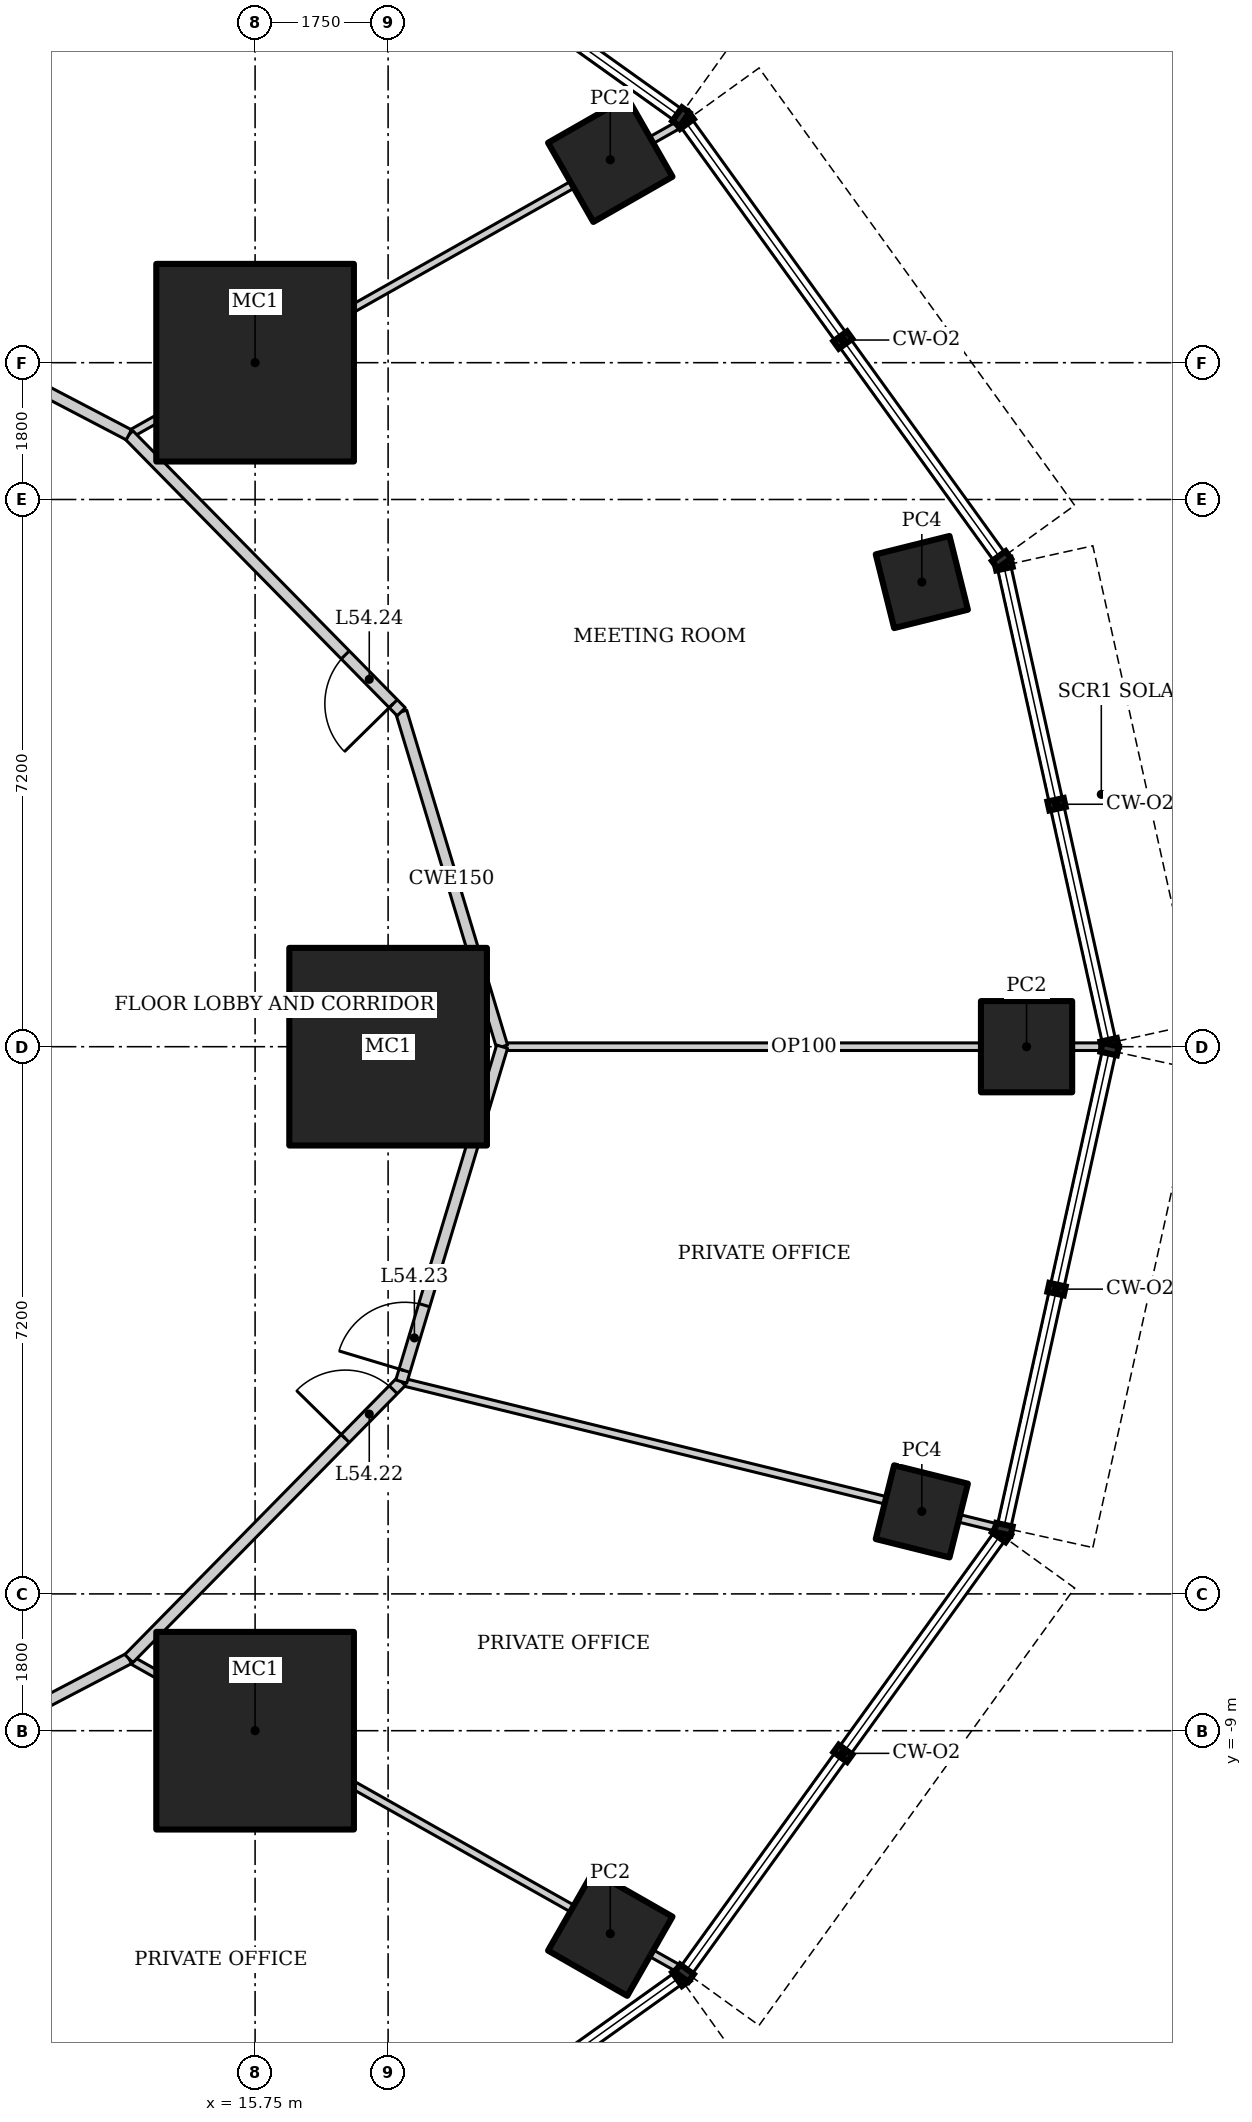
"""IFC4 building model, lengths in metres.
Left out: names, types, materials, properties, quantities, classifications, styles, units other than length and angle.
Written with IfcOpenShell. Run it as: python <this file> out.ifc"""

import sys

from ifc_helpers import new_model, si_unit, direction, frame, frame_2d, origin, origin_2d, place, context, subcontext, project, spatial, rectangle, hollow_rectangle, extrude, element, fill, save


model = new_model("IFC4")
c1 = context("Model", 3, precision=1e-05, world=origin(), true_north=direction((0.0, 1.0)))
c2 = subcontext(c1, "Body", "Model", "MODEL_VIEW")
j1 = project(units=[si_unit("LENGTHUNIT", "METRE"), si_unit("PLANEANGLEUNIT", "RADIAN")], contexts=[c1])
p1 = place(None, origin())
s1 = spatial("IfcSite", under=j1, at=p1, CompositionType="ELEMENT")
p2 = place(p1, origin())
s2 = spatial("IfcBuilding", under=s1, at=p2, CompositionType="ELEMENT")
p3 = place(p2, frame((0.0, 0.0, 232.6)))
s3 = spatial("IfcBuildingStorey", under=s2, at=p3, CompositionType="ELEMENT", Elevation=232.6)
for number, where, z_axis, x_axis in (
    (1, (17.5, 0.0, 0.0), (0.0, 0.0, 1.0), (1.0, 0.0, 0.0)),
    (2, (15.75, 9.0, 0.0), (0.0, 0.0, 1.0), (1.0, 0.0, 0.0)),
    (3, (15.75, -9.0, 0.0), (0.0, 0.0, 1.0), (1.0, 0.0, 0.0)),
):
    element("IfcColumn", number, at=place(p3, frame(where, z_axis=z_axis, x_axis=x_axis)), inside=s3, PredefinedType="COLUMN", context=c2, shape_type="SweptSolid", body=[
        extrude(hollow_rectangle(XDim=2.6, YDim=2.6, WallThickness=0.13, at=origin_2d()), origin(), (0.0, 0.0, 1.0), 4.2),
    ])
p4 = place(p3, frame((25.9, 0.0, 0.0), z_axis=(0.0, 0.0, 1.0), x_axis=(1.0, 0.0, 0.0)))
e4 = element("IfcColumn", 4, at=p4, inside=s3, PredefinedType="COLUMN", context=c2, shape_type="SweptSolid", body=[
    extrude(hollow_rectangle(XDim=1.2, YDim=1.2, WallThickness=0.1, at=origin_2d()), origin(), (0.0, 0.0, 1.0), 4.2),
])
p5 = place(p3, frame((24.522, 6.114, 0.0), z_axis=(0.0, 0.0, 1.0), x_axis=(0.970295726276, 0.2419218956, 0.0)))
e5 = element("IfcColumn", 5, at=p5, inside=s3, PredefinedType="COLUMN", context=c2, shape_type="SweptSolid", body=[
    extrude(hollow_rectangle(XDim=1.0, YDim=1.0, WallThickness=0.08, at=origin_2d()), origin(), (0.0, 0.0, 1.0), 4.2),
])
for number, where, z_axis, x_axis in (
    (6, (20.423, 11.67, 0.0), (0.0, 0.0, 1.0), (0.868, 0.496, 0.0)),
    (7, (20.423, -11.67, 0.0), (0.0, 0.0, 1.0), (0.496, 0.868, 0.0)),
):
    element("IfcColumn", number, at=place(p3, frame(where, z_axis=z_axis, x_axis=x_axis)), inside=s3, PredefinedType="COLUMN", context=c2, shape_type="SweptSolid", body=[
        extrude(hollow_rectangle(XDim=1.2, YDim=1.2, WallThickness=0.1, at=origin_2d()), origin(), (0.0, 0.0, 1.0), 4.2),
    ])
p6 = place(p3, frame((24.522, -6.114, 0.0), z_axis=(0.0, 0.0, 1.0), x_axis=(0.2419218956, 0.970295726276, 0.0)))
e8 = element("IfcColumn", 8, at=p6, inside=s3, PredefinedType="COLUMN", context=c2, shape_type="SweptSolid", body=[
    extrude(hollow_rectangle(XDim=1.0, YDim=1.0, WallThickness=0.08, at=origin_2d()), origin(), (0.0, 0.0, 1.0), 4.2),
])
p7 = place(p3, frame((26.944, 0.0, 0.0), z_axis=(0.0, 0.0, 1.0), x_axis=(-1.0, 0.0, 0.0)))
e9 = element("IfcWall", 9, at=p7, inside=s3, PredefinedType="PARTITIONING", context=c2, shape_type="SweptSolid", body=[
    extrude(rectangle(XDim=7.944, YDim=0.1, at=frame_2d((3.972, 0.0))), origin(), (0.0, 0.0, 1.0), 3.349),
])
p8 = place(p3, frame((21.358, 12.15, 0.0), z_axis=(0.0, 0.0, 1.0), x_axis=(-0.871080529249, -0.491140215786, 0.0)))
e10 = element("IfcWall", 10, at=p8, inside=s3, PredefinedType="PARTITIONING", context=c2, shape_type="SweptSolid", body=[
    extrude(rectangle(XDim=8.345, YDim=0.1, at=frame_2d((4.173, 0.0))), origin(), (0.0, 0.0, 1.0), 3.524),
])
p9 = place(p3, frame((15.709, -16.199, 0.0), z_axis=(0.0, 0.0, 1.0), x_axis=(-0.69875697861, 0.715359129978, 0.0)))
e11 = element("IfcWall", 11, at=p9, inside=s3, PredefinedType="PARTITIONING", context=c2, shape_type="SweptSolid", body=[
    extrude(rectangle(XDim=8.323, YDim=0.1, at=frame_2d((4.162, 0.0))), origin(), (0.0, 0.0, 1.0), 3.41),
])
p10 = place(p3, frame((21.358, -12.15, 0.0), z_axis=(0.0, 0.0, 1.0), x_axis=(-0.871080529249, 0.491140215786, 0.0)))
e12 = element("IfcWall", 12, at=p10, inside=s3, PredefinedType="PARTITIONING", context=c2, shape_type="SweptSolid", body=[
    extrude(rectangle(XDim=8.345, YDim=0.1, at=frame_2d((4.173, 0.0))), origin(), (0.0, 0.0, 1.0), 3.521),
])
p11 = place(p3, frame((25.543, -6.336, 0.0), z_axis=(0.0, 0.0, 1.0), x_axis=(-0.97123661777, 0.238116425942, 0.0)))
e13 = element("IfcWall", 13, at=p11, inside=s3, PredefinedType="PARTITIONING", context=c2, shape_type="SweptSolid", body=[
    extrude(rectangle(XDim=8.103, YDim=0.1, at=frame_2d((4.052, 0.0))), origin(), (0.0, 0.0, 1.0), 3.108),
])
p12 = place(p3, frame((19.0, 0.0, 0.0), z_axis=(0.0, 0.0, 1.0), x_axis=(-0.288399048695, 0.957510307366, 0.0)))
e14 = element("IfcWall", 14, at=p12, inside=s3, PredefinedType="PARTITIONING", context=c2, shape_type="SweptSolid", body=[
    extrude(rectangle(XDim=4.602, YDim=0.15, at=frame_2d((2.301, 0.0))), origin(), (0.0, 0.0, 1.0), 4.05),
])
p13 = place(p3, frame((17.673, 4.406, 0.0), z_axis=(0.0, 0.0, 1.0), x_axis=(-0.701111216625, 0.713051934941, 0.0)))
e15 = element("IfcWall", 15, at=p13, inside=s3, PredefinedType="PARTITIONING", context=c2, shape_type="SweptSolid", body=[
    extrude(rectangle(XDim=5.112, YDim=0.15, at=frame_2d((2.556, 0.0))), origin(), (0.0, 0.0, 1.0), 4.05),
])
p14 = place(p13, frame((0.15, 0.0, 0.0)))
e16 = element("IfcOpeningElement", 16, at=p14, cuts=e15, PredefinedType="OPENING", context=c2, shape_type="SweptSolid", body=[
    extrude(rectangle(XDim=0.9, YDim=2.1, at=frame_2d((0.45, 1.05))), frame((0.0, 0.085, 0.0), z_axis=(0.0, -1.0, 0.0), x_axis=(1.0, 0.0, 0.0)), (0.0, 0.0, 1.0), 0.17),
])
p15 = place(p3, frame((14.089, 8.051, 0.0), z_axis=(0.0, 0.0, 1.0), x_axis=(-0.886174439647, 0.463351769735, 0.0)))
e17 = element("IfcWall", 17, at=p15, inside=s3, PredefinedType="PARTITIONING", context=c2, shape_type="SweptSolid", body=[
    extrude(rectangle(XDim=4.735, YDim=0.15, at=frame_2d((2.367, 0.0))), origin(), (0.0, 0.0, 1.0), 4.05),
])
p16 = place(p3, frame((9.893, -10.245, 0.0), z_axis=(0.0, 0.0, 1.0), x_axis=(0.886174439647, 0.463351769735, 0.0)))
e18 = element("IfcWall", 18, at=p16, inside=s3, PredefinedType="PARTITIONING", context=c2, shape_type="SweptSolid", body=[
    extrude(rectangle(XDim=4.735, YDim=0.15, at=frame_2d((2.367, 0.0))), origin(), (0.0, 0.0, 1.0), 4.05),
])
p17 = place(p16, frame((0.15, 0.0, 0.0)))
e19 = element("IfcOpeningElement", 19, at=p17, cuts=e18, PredefinedType="OPENING", context=c2, shape_type="SweptSolid", body=[
    extrude(rectangle(XDim=0.9, YDim=2.1, at=frame_2d((0.45, 1.05))), frame((0.0, 0.085, 0.0), z_axis=(0.0, -1.0, 0.0), x_axis=(1.0, 0.0, 0.0)), (0.0, 0.0, 1.0), 0.17),
])
p18 = place(p3, frame((14.089, -8.051, 0.0), z_axis=(0.0, 0.0, 1.0), x_axis=(0.701111216625, 0.713051934941, 0.0)))
e20 = element("IfcWall", 20, at=p18, inside=s3, PredefinedType="PARTITIONING", context=c2, shape_type="SweptSolid", body=[
    extrude(rectangle(XDim=5.112, YDim=0.15, at=frame_2d((2.556, 0.0))), origin(), (0.0, 0.0, 1.0), 4.05),
])
p19 = place(p18, frame((4.061, 0.0, 0.0)))
e21 = element("IfcOpeningElement", 21, at=p19, cuts=e20, PredefinedType="OPENING", context=c2, shape_type="SweptSolid", body=[
    extrude(rectangle(XDim=0.9, YDim=2.1, at=frame_2d((0.45, 1.05))), frame((0.0, 0.085, 0.0), z_axis=(0.0, -1.0, 0.0), x_axis=(1.0, 0.0, 0.0)), (0.0, 0.0, 1.0), 0.17),
])
p20 = place(p3, frame((17.673, -4.406, 0.0), z_axis=(0.0, 0.0, 1.0), x_axis=(0.288399048695, 0.957510307366, 0.0)))
e22 = element("IfcWall", 22, at=p20, inside=s3, PredefinedType="PARTITIONING", context=c2, shape_type="SweptSolid", body=[
    extrude(rectangle(XDim=4.602, YDim=0.15, at=frame_2d((2.301, 0.0))), origin(), (0.0, 0.0, 1.0), 4.05),
])
p21 = place(p20, frame((0.15, 0.0, 0.0)))
e23 = element("IfcOpeningElement", 23, at=p21, cuts=e22, PredefinedType="OPENING", context=c2, shape_type="SweptSolid", body=[
    extrude(rectangle(XDim=0.9, YDim=2.1, at=frame_2d((0.45, 1.05))), frame((0.0, 0.085, 0.0), z_axis=(0.0, -1.0, 0.0), x_axis=(1.0, 0.0, 0.0)), (0.0, 0.0, 1.0), 0.17),
])
p22 = place(p3, frame((12.6, 13.0, 0.0), z_axis=(0.0, 0.0, 1.0), x_axis=(0.682434118301, 0.730947107648, 0.0)))
e24 = element("IfcWall", 24, at=p22, inside=s3, PredefinedType="PARTITIONING", context=c2, shape_type="SweptSolid", body=[
    extrude(rectangle(XDim=2.702, YDim=0.1, at=frame_2d((1.351, 0.0))), origin(), (0.0, 0.0, 1.0), 3.41),
])
p23 = place(p19, origin())
e25 = element("IfcDoor", 25, at=p23, inside=s3, OperationType="SINGLE_SWING_LEFT", PredefinedType="DOOR", context=c2, shape_type="SweptSolid", body=[
    extrude(rectangle(XDim=0.9, YDim=2.1, at=frame_2d((0.45, 1.05))), frame((0.0, 0.025, 0.0), z_axis=(0.0, -1.0, 0.0), x_axis=(1.0, 0.0, 0.0)), (0.0, 0.0, 1.0), 0.05),
])
fill(e21, e25)
p24 = place(p21, origin())
e26 = element("IfcDoor", 26, at=p24, inside=s3, OperationType="SINGLE_SWING_LEFT", PredefinedType="DOOR", context=c2, shape_type="SweptSolid", body=[
    extrude(rectangle(XDim=0.9, YDim=2.1, at=frame_2d((0.45, 1.05))), frame((0.0, 0.025, 0.0), z_axis=(0.0, -1.0, 0.0), x_axis=(1.0, 0.0, 0.0)), (0.0, 0.0, 1.0), 0.05),
])
fill(e23, e26)
p25 = place(p14, origin())
e27 = element("IfcDoor", 27, at=p25, inside=s3, OperationType="SINGLE_SWING_LEFT", PredefinedType="DOOR", context=c2, shape_type="SweptSolid", body=[
    extrude(rectangle(XDim=0.9, YDim=2.1, at=frame_2d((0.45, 1.05))), frame((0.0, 0.025, 0.0), z_axis=(0.0, -1.0, 0.0), x_axis=(1.0, 0.0, 0.0)), (0.0, 0.0, 1.0), 0.05),
])
fill(e16, e27)
save(model, sys.argv[1])
